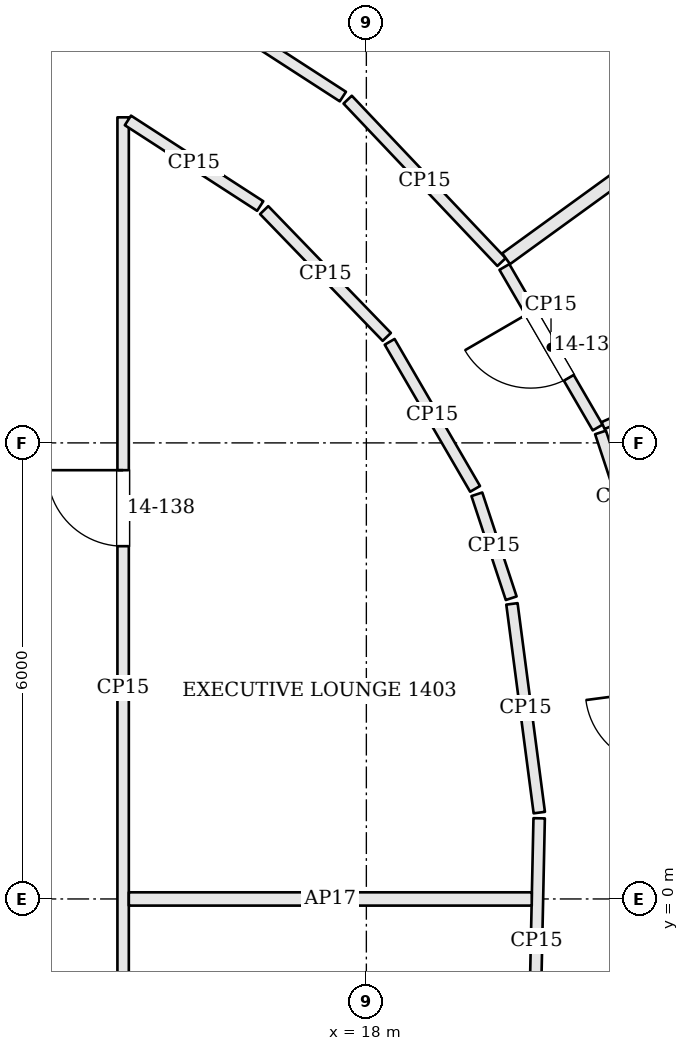
"""IFC4 building model, lengths in metres.
Left out: names, types, materials, properties, quantities, classifications, styles, units other than length and angle.
Written with IfcOpenShell. Run it as: python <this file> out.ifc"""

import sys

from ifc_helpers import new_model, si_unit, direction, frame, frame_2d, origin, place, context, subcontext, project, spatial, rectangle, extrude, element, fill, save


model = new_model("IFC4")
c1 = context("Model", 3, precision=1e-05, world=origin(), true_north=direction((0.0, 1.0)))
c2 = subcontext(c1, "Body", "Model", "MODEL_VIEW")
j1 = project(units=[si_unit("LENGTHUNIT", "METRE"), si_unit("PLANEANGLEUNIT", "RADIAN")], contexts=[c1])
p1 = place(None, origin())
s1 = spatial("IfcSite", under=j1, at=p1, CompositionType="ELEMENT")
p2 = place(p1, origin())
s2 = spatial("IfcBuilding", under=s1, at=p2, CompositionType="ELEMENT")
p3 = place(p2, frame((0.0, 0.0, 66.3)))
s3 = spatial("IfcBuildingStorey", under=s2, at=p3, CompositionType="ELEMENT", Elevation=66.3)
p4 = place(p3, frame((19.778, 8.379, 0.0), z_axis=(0.0, 0.0, 1.0), x_axis=(-0.687769957484, 0.725928705578, 0.0)))
e1 = element("IfcWall", 1, at=p4, inside=s3, PredefinedType="PARTITIONING", context=c2, shape_type="SweptSolid", body=[
    extrude(rectangle(XDim=2.943, YDim=0.15, at=frame_2d((1.472, 0.0))), origin(), (0.0, 0.0, 1.0), 2.68),
])
p5 = place(p3, frame((17.691, 10.556, 0.0), z_axis=(0.0, 0.0, 1.0), x_axis=(-0.839564450265, 0.54326009779, 0.0)))
e2 = element("IfcWall", 2, at=p5, inside=s3, PredefinedType="PARTITIONING", context=c2, shape_type="SweptSolid", body=[
    extrude(rectangle(XDim=3.443, YDim=0.15, at=frame_2d((1.722, 0.0))), origin(), (0.0, 0.0, 1.0), 2.68),
])
p6 = place(p3, frame((27.245, 13.794, 0.0), z_axis=(0.0, 0.0, 1.0), x_axis=(-0.809545443227, -0.58705721642, 0.0)))
e3 = element("IfcWall", 3, at=p6, inside=s3, PredefinedType="PARTITIONING", context=c2, shape_type="SweptSolid", body=[
    extrude(rectangle(XDim=9.148, YDim=0.175, at=frame_2d((4.574, 0.0))), origin(), (0.0, 0.0, 1.0), 2.68),
])
p7 = place(p3, frame((21.645, 4.43, 0.0), z_axis=(0.0, 0.0, 1.0), x_axis=(-0.313700743044, 0.949521902756, 0.0)))
e4 = element("IfcWall", 4, at=p7, inside=s3, PredefinedType="PARTITIONING", context=c2, shape_type="SweptSolid", body=[
    extrude(rectangle(XDim=1.798, YDim=0.15, at=frame_2d((0.899, 0.0))), origin(), (0.0, 0.0, 1.0), 2.68),
])
p8 = place(p3, frame((21.043, 6.202, 0.0), z_axis=(0.0, 0.0, 1.0), x_axis=(-0.502422412937, 0.864622298451, 0.0)))
e5 = element("IfcWall", 5, at=p8, inside=s3, PredefinedType="PARTITIONING", context=c2, shape_type="SweptSolid", body=[
    extrude(rectangle(XDim=2.443, YDim=0.15, at=frame_2d((1.221, 0.0))), origin(), (0.0, 0.0, 1.0), 2.68),
])
p9 = place(p8, frame((0.756, 0.0, 0.0)))
e6 = element("IfcOpeningElement", 6, at=p9, cuts=e5, PredefinedType="OPENING", context=c2, shape_type="SweptSolid", body=[
    extrude(rectangle(XDim=1.0, YDim=2.1, at=frame_2d((0.5, 1.05))), frame((0.0, 0.085, 0.0), z_axis=(0.0, -1.0, 0.0), x_axis=(1.0, 0.0, 0.0)), (0.0, 0.0, 1.0), 0.17),
])
p10 = place(p3, frame((14.8, -4.725, 0.0), z_axis=(0.0, 0.0, 1.0), x_axis=(0.0, 1.0, 0.0)))
e7 = element("IfcWall", 7, at=p10, inside=s3, PredefinedType="PARTITIONING", context=c2, shape_type="SweptSolid", body=[
    extrude(rectangle(XDim=15.008, YDim=0.15, at=frame_2d((7.504, 0.0))), origin(), (0.0, 0.0, 1.0), 2.68),
])
p11 = place(p10, frame((9.366, 0.0, 0.0)))
e8 = element("IfcOpeningElement", 8, at=p11, cuts=e7, PredefinedType="OPENING", context=c2, shape_type="SweptSolid", body=[
    extrude(rectangle(XDim=1.0, YDim=2.1, at=frame_2d((0.5, 1.05))), frame((0.0, 0.085, 0.0), z_axis=(0.0, -1.0, 0.0), x_axis=(1.0, 0.0, 0.0)), (0.0, 0.0, 1.0), 0.17),
])
p12 = place(p3, frame((14.863, 10.242, 0.0), z_axis=(0.0, 0.0, 1.0), x_axis=(0.839563837869, -0.543261044198, 0.0)))
e9 = element("IfcWall", 9, at=p12, inside=s3, PredefinedType="PARTITIONING", context=c2, shape_type="SweptSolid", body=[
    extrude(rectangle(XDim=2.073, YDim=0.15, at=frame_2d((1.037, 0.0))), origin(), (0.0, 0.0, 1.0), 2.68),
])
p13 = place(p3, frame((16.656, 9.062, 0.0), z_axis=(0.0, 0.0, 1.0), x_axis=(0.695225115827, -0.718792068906, 0.0)))
e10 = element("IfcWall", 10, at=p13, inside=s3, PredefinedType="PARTITIONING", context=c2, shape_type="SweptSolid", body=[
    extrude(rectangle(XDim=2.321, YDim=0.15, at=frame_2d((1.16, 0.0))), origin(), (0.0, 0.0, 1.0), 2.68),
])
p14 = place(p3, frame((18.306, 7.329, 0.0), z_axis=(0.0, 0.0, 1.0), x_axis=(0.502425081691, -0.864620747662, 0.0)))
e11 = element("IfcWall", 11, at=p14, inside=s3, PredefinedType="PARTITIONING", context=c2, shape_type="SweptSolid", body=[
    extrude(rectangle(XDim=2.237, YDim=0.15, at=frame_2d((1.119, 0.0))), origin(), (0.0, 0.0, 1.0), 2.68),
])
p15 = place(p3, frame((19.454, 5.324, 0.0), z_axis=(0.0, 0.0, 1.0), x_axis=(0.313632756375, -0.949544361327, 0.0)))
e12 = element("IfcWall", 12, at=p15, inside=s3, PredefinedType="PARTITIONING", context=c2, shape_type="SweptSolid", body=[
    extrude(rectangle(XDim=1.44, YDim=0.15, at=frame_2d((0.72, 0.0))), origin(), (0.0, 0.0, 1.0), 2.68),
])
p16 = place(p3, frame((19.915, 3.882, 0.0), z_axis=(0.0, 0.0, 1.0), x_axis=(0.129945947446, -0.991521079323, 0.0)))
e13 = element("IfcWall", 13, at=p16, inside=s3, PredefinedType="PARTITIONING", context=c2, shape_type="SweptSolid", body=[
    extrude(rectangle(XDim=2.769, YDim=0.15, at=frame_2d((1.385, 0.0))), origin(), (0.0, 0.0, 1.0), 2.68),
])
p17 = place(p3, frame((20.273, 1.061, 0.0), z_axis=(0.0, 0.0, 1.0), x_axis=(-0.021166906337, -0.99977595594, 0.0)))
e14 = element("IfcWall", 14, at=p17, inside=s3, PredefinedType="PARTITIONING", context=c2, shape_type="SweptSolid", body=[
    extrude(rectangle(XDim=3.218, YDim=0.15, at=frame_2d((1.609, 0.0))), origin(), (0.0, 0.0, 1.0), 2.68),
])
p18 = place(p3, frame((28.213, 9.371, 0.0), z_axis=(0.0, 0.0, 1.0), x_axis=(-0.914345064768, -0.404935923986, 0.0)))
e15 = element("IfcWall", 15, at=p18, inside=s3, PredefinedType="PARTITIONING", context=c2, shape_type="SweptSolid", body=[
    extrude(rectangle(XDim=7.763, YDim=0.1, at=frame_2d((3.882, 0.0))), origin(), (0.0, 0.0, 1.0), 2.68),
])
p19 = place(p18, frame((1.5, 0.0, 0.0)))
e16 = element("IfcOpeningElement", 16, at=p19, cuts=e15, PredefinedType="OPENING", context=c2, shape_type="SweptSolid", body=[
    extrude(rectangle(XDim=0.9, YDim=2.4, at=frame_2d((0.45, 1.2))), frame((0.0, 0.06, 0.0), z_axis=(0.0, -1.0, 0.0), x_axis=(1.0, 0.0, 0.0)), (0.0, 0.0, 1.0), 0.12),
])
p20 = place(p3, frame((14.875, 0.0, 0.0), z_axis=(0.0, 0.0, 1.0), x_axis=(1.0, 0.0, 0.0)))
e17 = element("IfcWall", 17, at=p20, inside=s3, PredefinedType="PARTITIONING", context=c2, shape_type="SweptSolid", body=[
    extrude(rectangle(XDim=5.301, YDim=0.175, at=frame_2d((2.65, 0.0))), origin(), (0.0, 0.0, 1.0), 2.68),
])
p21 = place(p9, origin())
e18 = element("IfcDoor", 18, at=p21, inside=s3, OperationType="SINGLE_SWING_RIGHT", PredefinedType="DOOR", context=c2, shape_type="SweptSolid", body=[
    extrude(rectangle(XDim=1.0, YDim=2.1, at=frame_2d((0.5, 1.05))), frame((0.0, 0.025, 0.0), z_axis=(0.0, -1.0, 0.0), x_axis=(1.0, 0.0, 0.0)), (0.0, 0.0, 1.0), 0.05),
])
fill(e6, e18)
p22 = place(p11, origin())
e19 = element("IfcDoor", 19, at=p22, inside=s3, OperationType="SINGLE_SWING_RIGHT", PredefinedType="DOOR", context=c2, shape_type="SweptSolid", body=[
    extrude(rectangle(XDim=1.0, YDim=2.1, at=frame_2d((0.5, 1.05))), frame((0.0, 0.025, 0.0), z_axis=(0.0, -1.0, 0.0), x_axis=(1.0, 0.0, 0.0)), (0.0, 0.0, 1.0), 0.05),
])
fill(e8, e19)
save(model, sys.argv[1])
